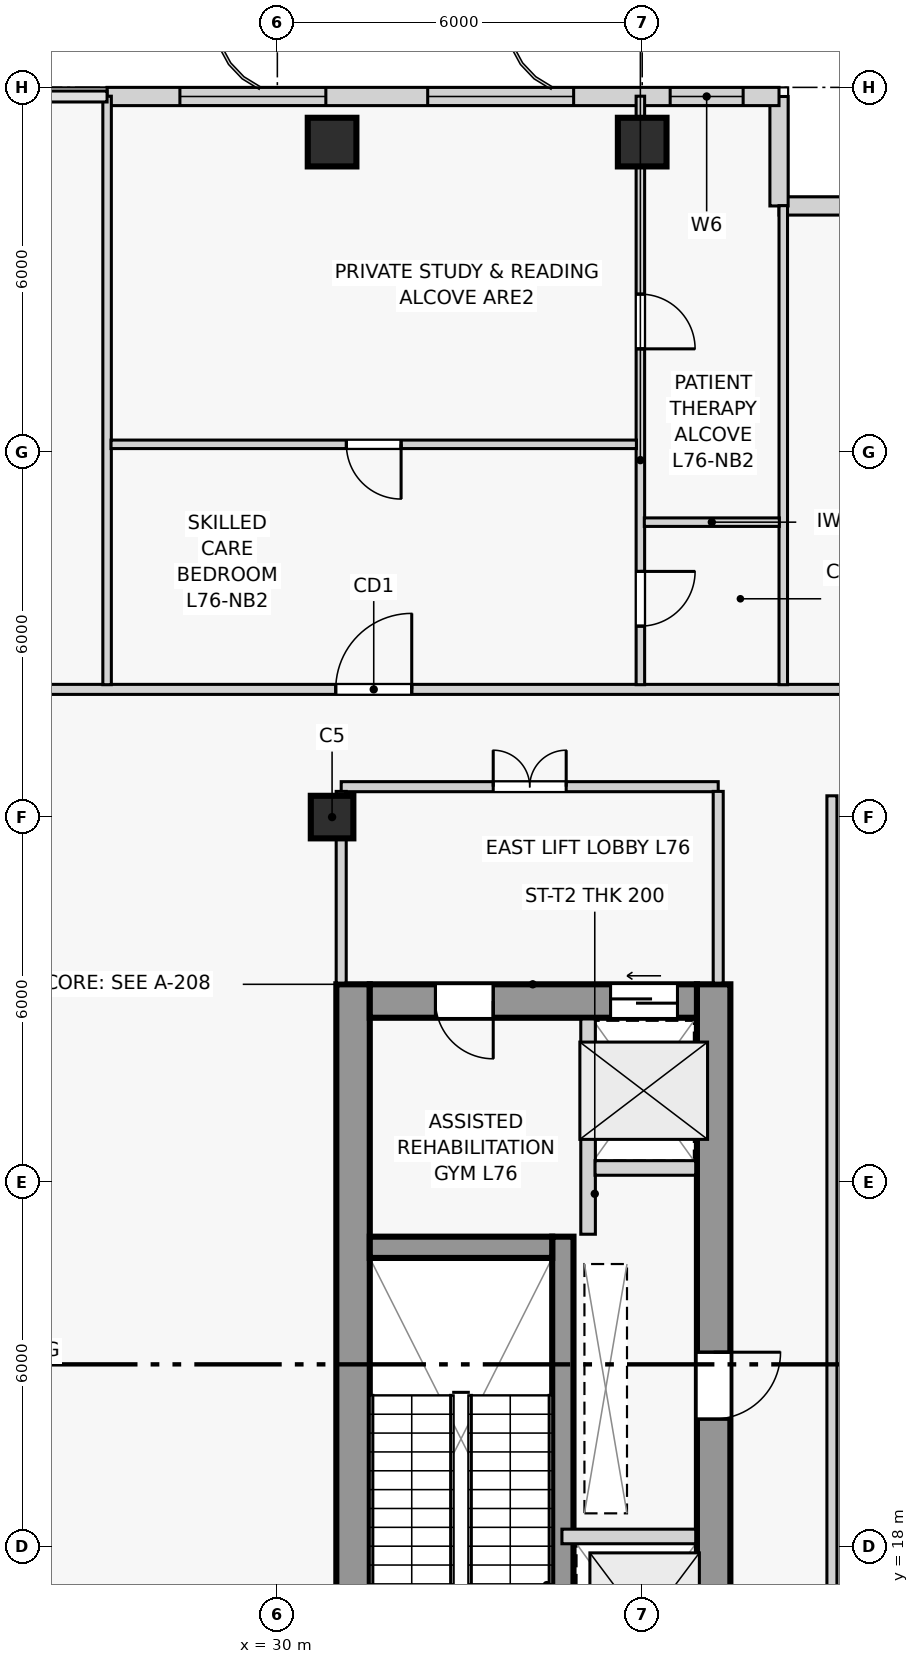
"""IFC4 building model, lengths in metres.
Left out: names, types, materials, properties, quantities, classifications, styles, units other than length and angle.
Written with IfcOpenShell. Run it as: python <this file> out.ifc"""

import sys

from ifc_helpers import new_model, si_unit, direction, frame, frame_2d, origin, origin_2d, place, context, subcontext, project, spatial, rectangle, extrude, source, transform, mapped, element, fill, save


model = new_model("IFC4")
c1 = context("Model", 3, precision=1e-05, world=origin(), true_north=direction((0.0, 1.0)))
c2 = subcontext(c1, "Body", "Model", "MODEL_VIEW")
j1 = project(units=[si_unit("LENGTHUNIT", "METRE"), si_unit("PLANEANGLEUNIT", "RADIAN")], contexts=[c1])
p1 = place(None, origin())
s1 = spatial("IfcSite", under=j1, at=p1, CompositionType="ELEMENT")
p2 = place(p1, origin())
s2 = spatial("IfcBuilding", under=s1, at=p2, CompositionType="ELEMENT")
p3 = place(p2, frame((0.0, 0.0, 289.5)))
s3 = spatial("IfcBuildingStorey", under=s2, at=p3, CompositionType="ELEMENT", Elevation=289.5)
p4 = place(p3, frame((31.245, 14.8, 0.0), z_axis=(0.0, 0.0, 1.0), x_axis=(0.0, 1.0, 0.0)))
e1 = element("IfcWall", 1, at=p4, inside=s3, PredefinedType="SHEAR", context=c2, shape_type="SweptSolid", body=[
    extrude(rectangle(XDim=12.45, YDim=0.55, at=frame_2d((6.225, 0.0))), origin(), (0.0, 0.0, 1.0), 4.2),
])
p5 = place(p3, frame((37.175, 14.8, 0.0), z_axis=(0.0, 0.0, 1.0), x_axis=(0.0, 1.0, 0.0)))
e2 = element("IfcWall", 2, at=p5, inside=s3, PredefinedType="SHEAR", context=c2, shape_type="SweptSolid", body=[
    extrude(rectangle(XDim=12.45, YDim=0.55, at=frame_2d((6.225, 0.0))), origin(), (0.0, 0.0, 1.0), 4.2),
])
p6 = place(p5, frame((5.3, 0.0, 0.0)))
e3 = element("IfcOpeningElement", 3, at=p6, cuts=e2, PredefinedType="OPENING", context=c2, shape_type="SweptSolid", body=[
    extrude(rectangle(XDim=1.1, YDim=2.2, at=frame_2d((0.55, 1.1))), frame((0.0, 0.285, 0.0), z_axis=(0.0, -1.0, 0.0), x_axis=(1.0, 0.0, 0.0)), (0.0, 0.0, 1.0), 0.57),
])
p7 = place(p3, frame((31.52, 26.975, 0.0), z_axis=(0.0, 0.0, 1.0), x_axis=(1.0, 0.0, 0.0)))
e4 = element("IfcWall", 4, at=p7, inside=s3, PredefinedType="SHEAR", context=c2, shape_type="SweptSolid", body=[
    extrude(rectangle(XDim=5.38, YDim=0.55, at=frame_2d((2.69, 0.0))), origin(), (0.0, 0.0, 1.0), 4.2),
])
p8 = place(p7, frame((1.08, 0.0, 0.0)))
e5 = element("IfcOpeningElement", 5, at=p8, cuts=e4, PredefinedType="OPENING", context=c2, shape_type="SweptSolid", body=[
    extrude(rectangle(XDim=0.95, YDim=2.1, at=frame_2d((0.475, 1.05))), frame((0.0, 0.285, 0.0), z_axis=(0.0, -1.0, 0.0), x_axis=(1.0, 0.0, 0.0)), (0.0, 0.0, 1.0), 0.57),
])
p9 = place(p7, frame((3.96, 0.0, 0.0)))
e6 = element("IfcOpeningElement", 6, at=p9, cuts=e4, PredefinedType="OPENING", context=c2, shape_type="SweptSolid", body=[
    extrude(rectangle(XDim=1.1, YDim=2.2, at=frame_2d((0.55, 1.1))), frame((0.0, 0.285, 0.0), z_axis=(0.0, -1.0, 0.0), x_axis=(1.0, 0.0, 0.0)), (0.0, 0.0, 1.0), 0.57),
])
p10 = place(p3, frame((34.695, 15.35, 0.0), z_axis=(0.0, 0.0, 1.0), x_axis=(0.0, 1.0, 0.0)))
e7 = element("IfcWall", 7, at=p10, inside=s3, PredefinedType="SHEAR", context=c2, shape_type="SweptSolid", body=[
    extrude(rectangle(XDim=7.75, YDim=0.35, at=frame_2d((3.875, 0.0))), origin(), (0.0, 0.0, 1.0), 4.2),
])
p11 = place(p3, frame((31.52, 22.925, 0.0), z_axis=(0.0, 0.0, 1.0), x_axis=(1.0, 0.0, 0.0)))
e8 = element("IfcWall", 8, at=p11, inside=s3, PredefinedType="SHEAR", context=c2, shape_type="SweptSolid", body=[
    extrude(rectangle(XDim=3.0, YDim=0.35, at=frame_2d((1.5, 0.0))), origin(), (0.0, 0.0, 1.0), 4.2),
])
m1 = source(origin(), c2, "Body", "SweptSolid", [
    extrude(rectangle(XDim=0.8, YDim=0.8, at=origin_2d()), origin(), (0.0, 0.0, 1.0), 4.2),
])
for number, where, z_axis, x_axis in (
    (9, (30.9, 41.1, 0.0), (0.0, 0.0, 1.0), (1.0, 0.0, 0.0)),
    (10, (36.0, 41.1, 0.0), (0.0, 0.0, 1.0), (1.0, 0.0, 0.0)),
):
    element("IfcColumn", number, at=place(p3, frame(where, z_axis=z_axis, x_axis=x_axis)), inside=s3, PredefinedType="COLUMN", context=c2, shape_type="MappedRepresentation", body=[
        mapped(m1, transform((0.0, 0.0, 0.0), scale=1.0)),
    ])
m2 = source(origin(), c2, "Body", "SweptSolid", [
    extrude(rectangle(XDim=0.7, YDim=0.7, at=origin_2d()), origin(), (0.0, 0.0, 1.0), 4.2),
])
p12 = place(p3, frame((30.9, 30.0, 0.0), z_axis=(0.0, 0.0, 1.0), x_axis=(1.0, 0.0, 0.0)))
e11 = element("IfcColumn", 11, at=p12, inside=s3, PredefinedType="COLUMN", context=c2, shape_type="MappedRepresentation", body=[
    mapped(m2, transform((0.0, 0.0, 0.0), scale=1.0)),
])
for number, where, z_axis, x_axis in (
    (12, (40.05, 40.05, 0.0), (0.0, 0.0, 1.0), (-1.0, 0.0, 0.0)),
    (13, (38.25, 40.05, 0.0), (0.0, 0.0, 1.0), (0.0, 1.0, 0.0)),
):
    element("IfcWall", number, at=place(p3, frame(where, z_axis=z_axis, x_axis=x_axis)), inside=s3, PredefinedType="SOLIDWALL", context=c2, shape_type="SweptSolid", body=[
        extrude(rectangle(XDim=1.8, YDim=0.3, at=frame_2d((0.9, 0.0))), origin(), (0.0, 0.0, 1.0), 3.92),
    ])
p13 = place(p3, frame((38.25, 41.85, 0.0), z_axis=(0.0, 0.0, 1.0), x_axis=(-1.0, 0.0, 0.0)))
e14 = element("IfcWall", 14, at=p13, inside=s3, PredefinedType="SOLIDWALL", context=c2, shape_type="SweptSolid", body=[
    extrude(rectangle(XDim=11.05, YDim=0.3, at=frame_2d((5.525, 0.0))), origin(), (0.0, 0.0, 1.0), 3.92),
])
p14 = place(p13, frame((0.59, 0.0, 0.95)))
e15 = element("IfcOpeningElement", 15, at=p14, cuts=e14, PredefinedType="OPENING", context=c2, shape_type="SweptSolid", body=[
    extrude(rectangle(XDim=1.2, YDim=1.5, at=frame_2d((0.6, 0.75))), frame((0.0, 0.16, 0.0), z_axis=(0.0, -1.0, 0.0), x_axis=(1.0, 0.0, 0.0)), (0.0, 0.0, 1.0), 0.32),
])
p15 = place(p13, frame((3.377, 0.0, 0.8)))
e16 = element("IfcOpeningElement", 16, at=p15, cuts=e14, PredefinedType="OPENING", context=c2, shape_type="SweptSolid", body=[
    extrude(rectangle(XDim=2.4, YDim=2.1, at=frame_2d((1.2, 1.05))), frame((0.0, 0.16, 0.0), z_axis=(0.0, -1.0, 0.0), x_axis=(1.0, 0.0, 0.0)), (0.0, 0.0, 1.0), 0.32),
])
p16 = place(p13, frame((7.452, 0.0, 0.8)))
e17 = element("IfcOpeningElement", 17, at=p16, cuts=e14, PredefinedType="OPENING", context=c2, shape_type="SweptSolid", body=[
    extrude(rectangle(XDim=2.4, YDim=2.1, at=frame_2d((1.2, 1.05))), frame((0.0, 0.16, 0.0), z_axis=(0.0, -1.0, 0.0), x_axis=(1.0, 0.0, 0.0)), (0.0, 0.0, 1.0), 0.32),
])
p17 = place(p3, frame((34.68, 18.17, 0.0), z_axis=(0.0, 0.0, 1.0), x_axis=(1.0, 0.0, 0.0)))
e18 = element("IfcWall", 18, at=p17, inside=s3, PredefinedType="PARTITIONING", context=c2, shape_type="SweptSolid", body=[
    extrude(rectangle(XDim=2.2, YDim=0.24, at=frame_2d((1.1, 0.0))), origin(), (0.0, 0.0, 1.0), 3.92),
])
p18 = place(p3, frame((35.11, 23.14, 0.0), z_axis=(0.0, 0.0, 1.0), x_axis=(0.0, 1.0, 0.0)))
e19 = element("IfcWall", 19, at=p18, inside=s3, PredefinedType="PARTITIONING", context=c2, shape_type="SweptSolid", body=[
    extrude(rectangle(XDim=3.54, YDim=0.24, at=frame_2d((1.77, 0.0))), origin(), (0.0, 0.0, 1.0), 3.92),
])
p19 = place(p3, frame((35.225, 24.23, 0.0), z_axis=(0.0, 0.0, 1.0), x_axis=(1.0, 0.0, 0.0)))
e20 = element("IfcWall", 20, at=p19, inside=s3, PredefinedType="PARTITIONING", context=c2, shape_type="SweptSolid", body=[
    extrude(rectangle(XDim=1.655, YDim=0.24, at=frame_2d((0.827, 0.0))), origin(), (0.0, 0.0, 1.0), 3.92),
])
p20 = place(p3, frame((31.05, 30.5, 0.0), z_axis=(0.0, 0.0, 1.0), x_axis=(1.0, 0.0, 0.0)))
e21 = element("IfcWall", 21, at=p20, inside=s3, PredefinedType="PARTITIONING", context=c2, shape_type="SweptSolid", body=[
    extrude(rectangle(XDim=6.2, YDim=0.165, at=frame_2d((3.1, 0.0))), origin(), (0.0, 0.0, 1.0), 3.92),
])
p21 = place(p20, frame((2.5, 0.0, 0.0)))
e22 = element("IfcOpeningElement", 22, at=p21, cuts=e21, PredefinedType="OPENING", context=c2, shape_type="SweptSolid", body=[
    extrude(rectangle(XDim=1.2, YDim=2.2, at=frame_2d((0.6, 1.1))), frame((0.0, 0.093, 0.0), z_axis=(0.0, -1.0, 0.0), x_axis=(1.0, 0.0, 0.0)), (0.0, 0.0, 1.0), 0.185),
])
for number, where, z_axis, x_axis in (
    (23, (31.05, 27.27, 0.0), (0.0, 0.0, 1.0), (0.0, 1.0, 0.0)),
    (24, (37.25, 27.27, 0.0), (0.0, 0.0, 1.0), (0.0, 1.0, 0.0)),
):
    element("IfcWall", number, at=place(p3, frame(where, z_axis=z_axis, x_axis=x_axis)), inside=s3, PredefinedType="PARTITIONING", context=c2, shape_type="SweptSolid", body=[
        extrude(rectangle(XDim=3.153, YDim=0.165, at=frame_2d((1.576, 0.0))), origin(), (0.0, 0.0, 1.0), 3.92),
    ])
p22 = place(p3, frame((3.145, 32.1, 0.0), z_axis=(0.0, 0.0, 1.0), x_axis=(1.0, 0.0, 0.0)))
e25 = element("IfcWall", 25, at=p22, inside=s3, PredefinedType="PARTITIONING", context=c2, shape_type="SweptSolid", body=[
    extrude(rectangle(XDim=38.71, YDim=0.165, at=frame_2d((19.355, 0.0))), origin(), (0.0, 0.0, 1.0), 3.92),
])
p23 = place(p22, frame((7.195, 0.0, 0.0)))
e26 = element("IfcOpeningElement", 26, at=p23, cuts=e25, PredefinedType="OPENING", context=c2, shape_type="SweptSolid", body=[
    extrude(rectangle(XDim=1.2, YDim=2.2, at=frame_2d((0.6, 1.1))), frame((0.0, 0.093, 0.0), z_axis=(0.0, -1.0, 0.0), x_axis=(1.0, 0.0, 0.0)), (0.0, 0.0, 1.0), 0.185),
])
p24 = place(p22, frame((17.58, 0.0, 0.0)))
e27 = element("IfcOpeningElement", 27, at=p24, cuts=e25, PredefinedType="OPENING", context=c2, shape_type="SweptSolid", body=[
    extrude(rectangle(XDim=0.95, YDim=2.1, at=frame_2d((0.475, 1.05))), frame((0.0, 0.093, 0.0), z_axis=(0.0, -1.0, 0.0), x_axis=(1.0, 0.0, 0.0)), (0.0, 0.0, 1.0), 0.185),
])
p25 = place(p22, frame((27.815, 0.0, 0.0)))
e28 = element("IfcOpeningElement", 28, at=p25, cuts=e25, PredefinedType="OPENING", context=c2, shape_type="SweptSolid", body=[
    extrude(rectangle(XDim=1.25, YDim=2.2, at=frame_2d((0.625, 1.1))), frame((0.0, 0.093, 0.0), z_axis=(0.0, -1.0, 0.0), x_axis=(1.0, 0.0, 0.0)), (0.0, 0.0, 1.0), 0.185),
])
p26 = place(p3, frame((39.12, 11.45, 0.0), z_axis=(0.0, 0.0, 1.0), x_axis=(0.0, 1.0, 0.0)))
e29 = element("IfcWall", 29, at=p26, inside=s3, PredefinedType="PARTITIONING", context=c2, shape_type="SweptSolid", body=[
    extrude(rectangle(XDim=18.9, YDim=0.165, at=frame_2d((9.45, 0.0))), origin(), (0.0, 0.0, 1.0), 3.92),
])
p27 = place(p26, frame((2.05, 0.0, 0.0)))
e30 = element("IfcOpeningElement", 30, at=p27, cuts=e29, PredefinedType="OPENING", context=c2, shape_type="SweptSolid", body=[
    extrude(rectangle(XDim=0.95, YDim=2.1, at=frame_2d((0.475, 1.05))), frame((0.0, 0.093, 0.0), z_axis=(0.0, -1.0, 0.0), x_axis=(1.0, 0.0, 0.0)), (0.0, 0.0, 1.0), 0.185),
])
p28 = place(p3, frame((27.2, 32.177, 0.0), z_axis=(0.0, 0.0, 1.0), x_axis=(0.0, 1.0, 0.0)))
e31 = element("IfcWall", 31, at=p28, inside=s3, PredefinedType="PARTITIONING", context=c2, shape_type="SweptSolid", body=[
    extrude(rectangle(XDim=9.677, YDim=0.14, at=frame_2d((4.839, 0.0))), origin(), (0.0, 0.0, 1.0), 3.92),
])
p29 = place(p3, frame((38.32, 32.177, 0.0), z_axis=(0.0, 0.0, 1.0), x_axis=(0.0, 1.0, 0.0)))
e32 = element("IfcWall", 32, at=p29, inside=s3, PredefinedType="PARTITIONING", context=c2, shape_type="SweptSolid", body=[
    extrude(rectangle(XDim=7.877, YDim=0.14, at=frame_2d((3.939, 0.0))), origin(), (0.0, 0.0, 1.0), 3.92),
])
p30 = place(p3, frame((35.97, 32.177, 0.0), z_axis=(0.0, 0.0, 1.0), x_axis=(0.0, 1.0, 0.0)))
e33 = element("IfcWall", 33, at=p30, inside=s3, PredefinedType="PLUMBINGWALL", context=c2, shape_type="SweptSolid", body=[
    extrude(rectangle(XDim=9.677, YDim=0.14, at=frame_2d((4.839, 0.0))), origin(), (0.0, 0.0, 1.0), 3.07),
])
p31 = place(p30, frame((0.962, 0.0, 0.0)))
e34 = element("IfcOpeningElement", 34, at=p31, cuts=e33, PredefinedType="OPENING", context=c2, shape_type="SweptSolid", body=[
    extrude(rectangle(XDim=0.9, YDim=2.1, at=frame_2d((0.45, 1.05))), frame((0.0, 0.08, 0.0), z_axis=(0.0, -1.0, 0.0), x_axis=(1.0, 0.0, 0.0)), (0.0, 0.0, 1.0), 0.16),
])
p32 = place(p30, frame((5.522, 0.0, 0.0)))
e35 = element("IfcOpeningElement", 35, at=p32, cuts=e33, PredefinedType="OPENING", context=c2, shape_type="SweptSolid", body=[
    extrude(rectangle(XDim=0.9, YDim=2.1, at=frame_2d((0.45, 1.05))), frame((0.0, 0.08, 0.0), z_axis=(0.0, -1.0, 0.0), x_axis=(1.0, 0.0, 0.0)), (0.0, 0.0, 1.0), 0.16),
])
p33 = place(p3, frame((36.035, 34.85, 0.0), z_axis=(0.0, 0.0, 1.0), x_axis=(1.0, 0.0, 0.0)))
e36 = element("IfcWall", 36, at=p33, inside=s3, PredefinedType="PLUMBINGWALL", context=c2, shape_type="SweptSolid", body=[
    extrude(rectangle(XDim=2.22, YDim=0.14, at=frame_2d((1.11, 0.0))), origin(), (0.0, 0.0, 1.0), 3.92),
])
p34 = place(p3, frame((27.265, 36.13, 0.0), z_axis=(0.0, 0.0, 1.0), x_axis=(1.0, 0.0, 0.0)))
e37 = element("IfcWall", 37, at=p34, inside=s3, PredefinedType="PARTITIONING", context=c2, shape_type="SweptSolid", body=[
    extrude(rectangle(XDim=8.64, YDim=0.14, at=frame_2d((4.32, 0.0))), origin(), (0.0, 0.0, 1.0), 3.52),
])
p35 = place(p34, frame((3.87, 0.0, 0.0)))
e38 = element("IfcOpeningElement", 38, at=p35, cuts=e37, PredefinedType="OPENING", context=c2, shape_type="SweptSolid", body=[
    extrude(rectangle(XDim=0.9, YDim=2.1, at=frame_2d((0.45, 1.05))), frame((0.0, 0.08, 0.0), z_axis=(0.0, -1.0, 0.0), x_axis=(1.0, 0.0, 0.0)), (0.0, 0.0, 1.0), 0.16),
])
m3 = source(origin(), c2, "Body", "SweptSolid", [
    extrude(rectangle(XDim=1.2, YDim=1.5, at=frame_2d((0.6, 0.75))), frame((0.0, 0.03, 0.0), z_axis=(0.0, -1.0, 0.0), x_axis=(1.0, 0.0, 0.0)), (0.0, 0.0, 1.0), 0.06),
])
p36 = place(p14, origin())
e39 = element("IfcWindow", 39, at=p36, inside=s3, PartitioningType="SINGLE_PANEL", PredefinedType="WINDOW", context=c2, shape_type="MappedRepresentation", body=[
    mapped(m3, transform((0.0, 0.0, 0.0), scale=1.0)),
])
fill(e15, e39)
m4 = source(origin(), c2, "Body", "SweptSolid", [
    extrude(rectangle(XDim=2.4, YDim=2.1, at=frame_2d((1.2, 1.05))), frame((0.0, 0.03, 0.0), z_axis=(0.0, -1.0, 0.0), x_axis=(1.0, 0.0, 0.0)), (0.0, 0.0, 1.0), 0.06),
])
p37 = place(p15, origin())
e40 = element("IfcWindow", 40, at=p37, inside=s3, PartitioningType="SINGLE_PANEL", PredefinedType="WINDOW", context=c2, shape_type="MappedRepresentation", body=[
    mapped(m4, transform((0.0, 0.0, 0.0), scale=1.0)),
])
fill(e16, e40)
p38 = place(p16, origin())
e41 = element("IfcWindow", 41, at=p38, inside=s3, PartitioningType="SINGLE_PANEL", PredefinedType="WINDOW", context=c2, shape_type="MappedRepresentation", body=[
    mapped(m4, transform((0.0, 0.0, 0.0), scale=1.0)),
])
fill(e17, e41)
m5 = source(origin(), c2, "Body", "SweptSolid", [
    extrude(rectangle(XDim=0.95, YDim=2.1, at=frame_2d((0.475, 1.05))), frame((0.0, 0.025, 0.0), z_axis=(0.0, -1.0, 0.0), x_axis=(1.0, 0.0, 0.0)), (0.0, 0.0, 1.0), 0.05),
])
p39 = place(p8, frame((0.95, 0.0, 0.0), z_axis=(0.0, 0.0, 1.0), x_axis=(-1.0, 0.0, 0.0)))
e42 = element("IfcDoor", 42, at=p39, inside=s3, OperationType="SINGLE_SWING_LEFT", PredefinedType="DOOR", context=c2, shape_type="MappedRepresentation", body=[
    mapped(m5, transform((0.0, 0.0, 0.0), scale=1.0)),
])
fill(e5, e42)
m6 = source(origin(), c2, "Body", "SweptSolid", [
    extrude(rectangle(XDim=1.1, YDim=2.2, at=frame_2d((0.55, 1.1))), frame((0.0, 0.025, 0.0), z_axis=(0.0, -1.0, 0.0), x_axis=(1.0, 0.0, 0.0)), (0.0, 0.0, 1.0), 0.05),
])
p40 = place(p9, origin())
e43 = element("IfcDoor", 43, at=p40, inside=s3, OperationType="SLIDING_TO_LEFT", PredefinedType="DOOR", context=c2, shape_type="MappedRepresentation", body=[
    mapped(m6, transform((0.0, 0.0, 0.0), scale=1.0)),
])
fill(e6, e43)
m7 = source(origin(), c2, "Body", "SweptSolid", [
    extrude(rectangle(XDim=1.2, YDim=2.2, at=frame_2d((0.6, 1.1))), frame((0.0, 0.025, 0.0), z_axis=(0.0, -1.0, 0.0), x_axis=(1.0, 0.0, 0.0)), (0.0, 0.0, 1.0), 0.05),
])
p41 = place(p21, origin())
e44 = element("IfcDoor", 44, at=p41, inside=s3, OperationType="DOUBLE_DOOR_SINGLE_SWING", PredefinedType="DOOR", context=c2, shape_type="MappedRepresentation", body=[
    mapped(m7, transform((0.0, 0.0, 0.0), scale=1.0)),
])
fill(e22, e44)
m8 = source(origin(), c2, "Body", "SweptSolid", [
    extrude(rectangle(XDim=1.1, YDim=2.2, at=frame_2d((0.55, 1.1))), frame((0.0, 0.025, 0.0), z_axis=(0.0, -1.0, 0.0), x_axis=(1.0, 0.0, 0.0)), (0.0, 0.0, 1.0), 0.05),
])
p42 = place(p6, frame((1.1, 0.0, 0.0), z_axis=(0.0, 0.0, 1.0), x_axis=(-1.0, 0.0, 0.0)))
e45 = element("IfcDoor", 45, at=p42, inside=s3, OperationType="SINGLE_SWING_LEFT", PredefinedType="DOOR", context=c2, shape_type="MappedRepresentation", body=[
    mapped(m8, transform((0.0, 0.0, 0.0), scale=1.0)),
])
fill(e3, e45)
m9 = source(origin(), c2, "Body", "SweptSolid", [
    extrude(rectangle(XDim=1.25, YDim=2.2, at=frame_2d((0.625, 1.1))), frame((0.0, 0.025, 0.0), z_axis=(0.0, -1.0, 0.0), x_axis=(1.0, 0.0, 0.0)), (0.0, 0.0, 1.0), 0.05),
])
p43 = place(p25, origin())
e46 = element("IfcDoor", 46, at=p43, inside=s3, OperationType="SINGLE_SWING_RIGHT", PredefinedType="DOOR", context=c2, shape_type="MappedRepresentation", body=[
    mapped(m9, transform((0.0, 0.0, 0.0), scale=1.0)),
])
fill(e28, e46)
m10 = source(origin(), c2, "Body", "SweptSolid", [
    extrude(rectangle(XDim=0.9, YDim=2.1, at=frame_2d((0.45, 1.05))), frame((0.0, 0.025, 0.0), z_axis=(0.0, -1.0, 0.0), x_axis=(1.0, 0.0, 0.0)), (0.0, 0.0, 1.0), 0.05),
])
p44 = place(p31, frame((0.9, 0.0, 0.0), z_axis=(0.0, 0.0, 1.0), x_axis=(-1.0, 0.0, 0.0)))
e47 = element("IfcDoor", 47, at=p44, inside=s3, OperationType="SINGLE_SWING_LEFT", PredefinedType="DOOR", context=c2, shape_type="MappedRepresentation", body=[
    mapped(m10, transform((0.0, 0.0, 0.0), scale=1.0)),
])
fill(e34, e47)
p45 = place(p32, frame((0.9, 0.0, 0.0), z_axis=(0.0, 0.0, 1.0), x_axis=(-1.0, 0.0, 0.0)))
e48 = element("IfcDoor", 48, at=p45, inside=s3, OperationType="SINGLE_SWING_RIGHT", PredefinedType="DOOR", context=c2, shape_type="MappedRepresentation", body=[
    mapped(m10, transform((0.0, 0.0, 0.0), scale=1.0)),
])
fill(e35, e48)
p46 = place(p35, frame((0.9, 0.0, 0.0), z_axis=(0.0, 0.0, 1.0), x_axis=(-1.0, 0.0, 0.0)))
e49 = element("IfcDoor", 49, at=p46, inside=s3, OperationType="SINGLE_SWING_LEFT", PredefinedType="DOOR", context=c2, shape_type="MappedRepresentation", body=[
    mapped(m10, transform((0.0, 0.0, 0.0), scale=1.0)),
])
fill(e38, e49)
save(model, sys.argv[1])
